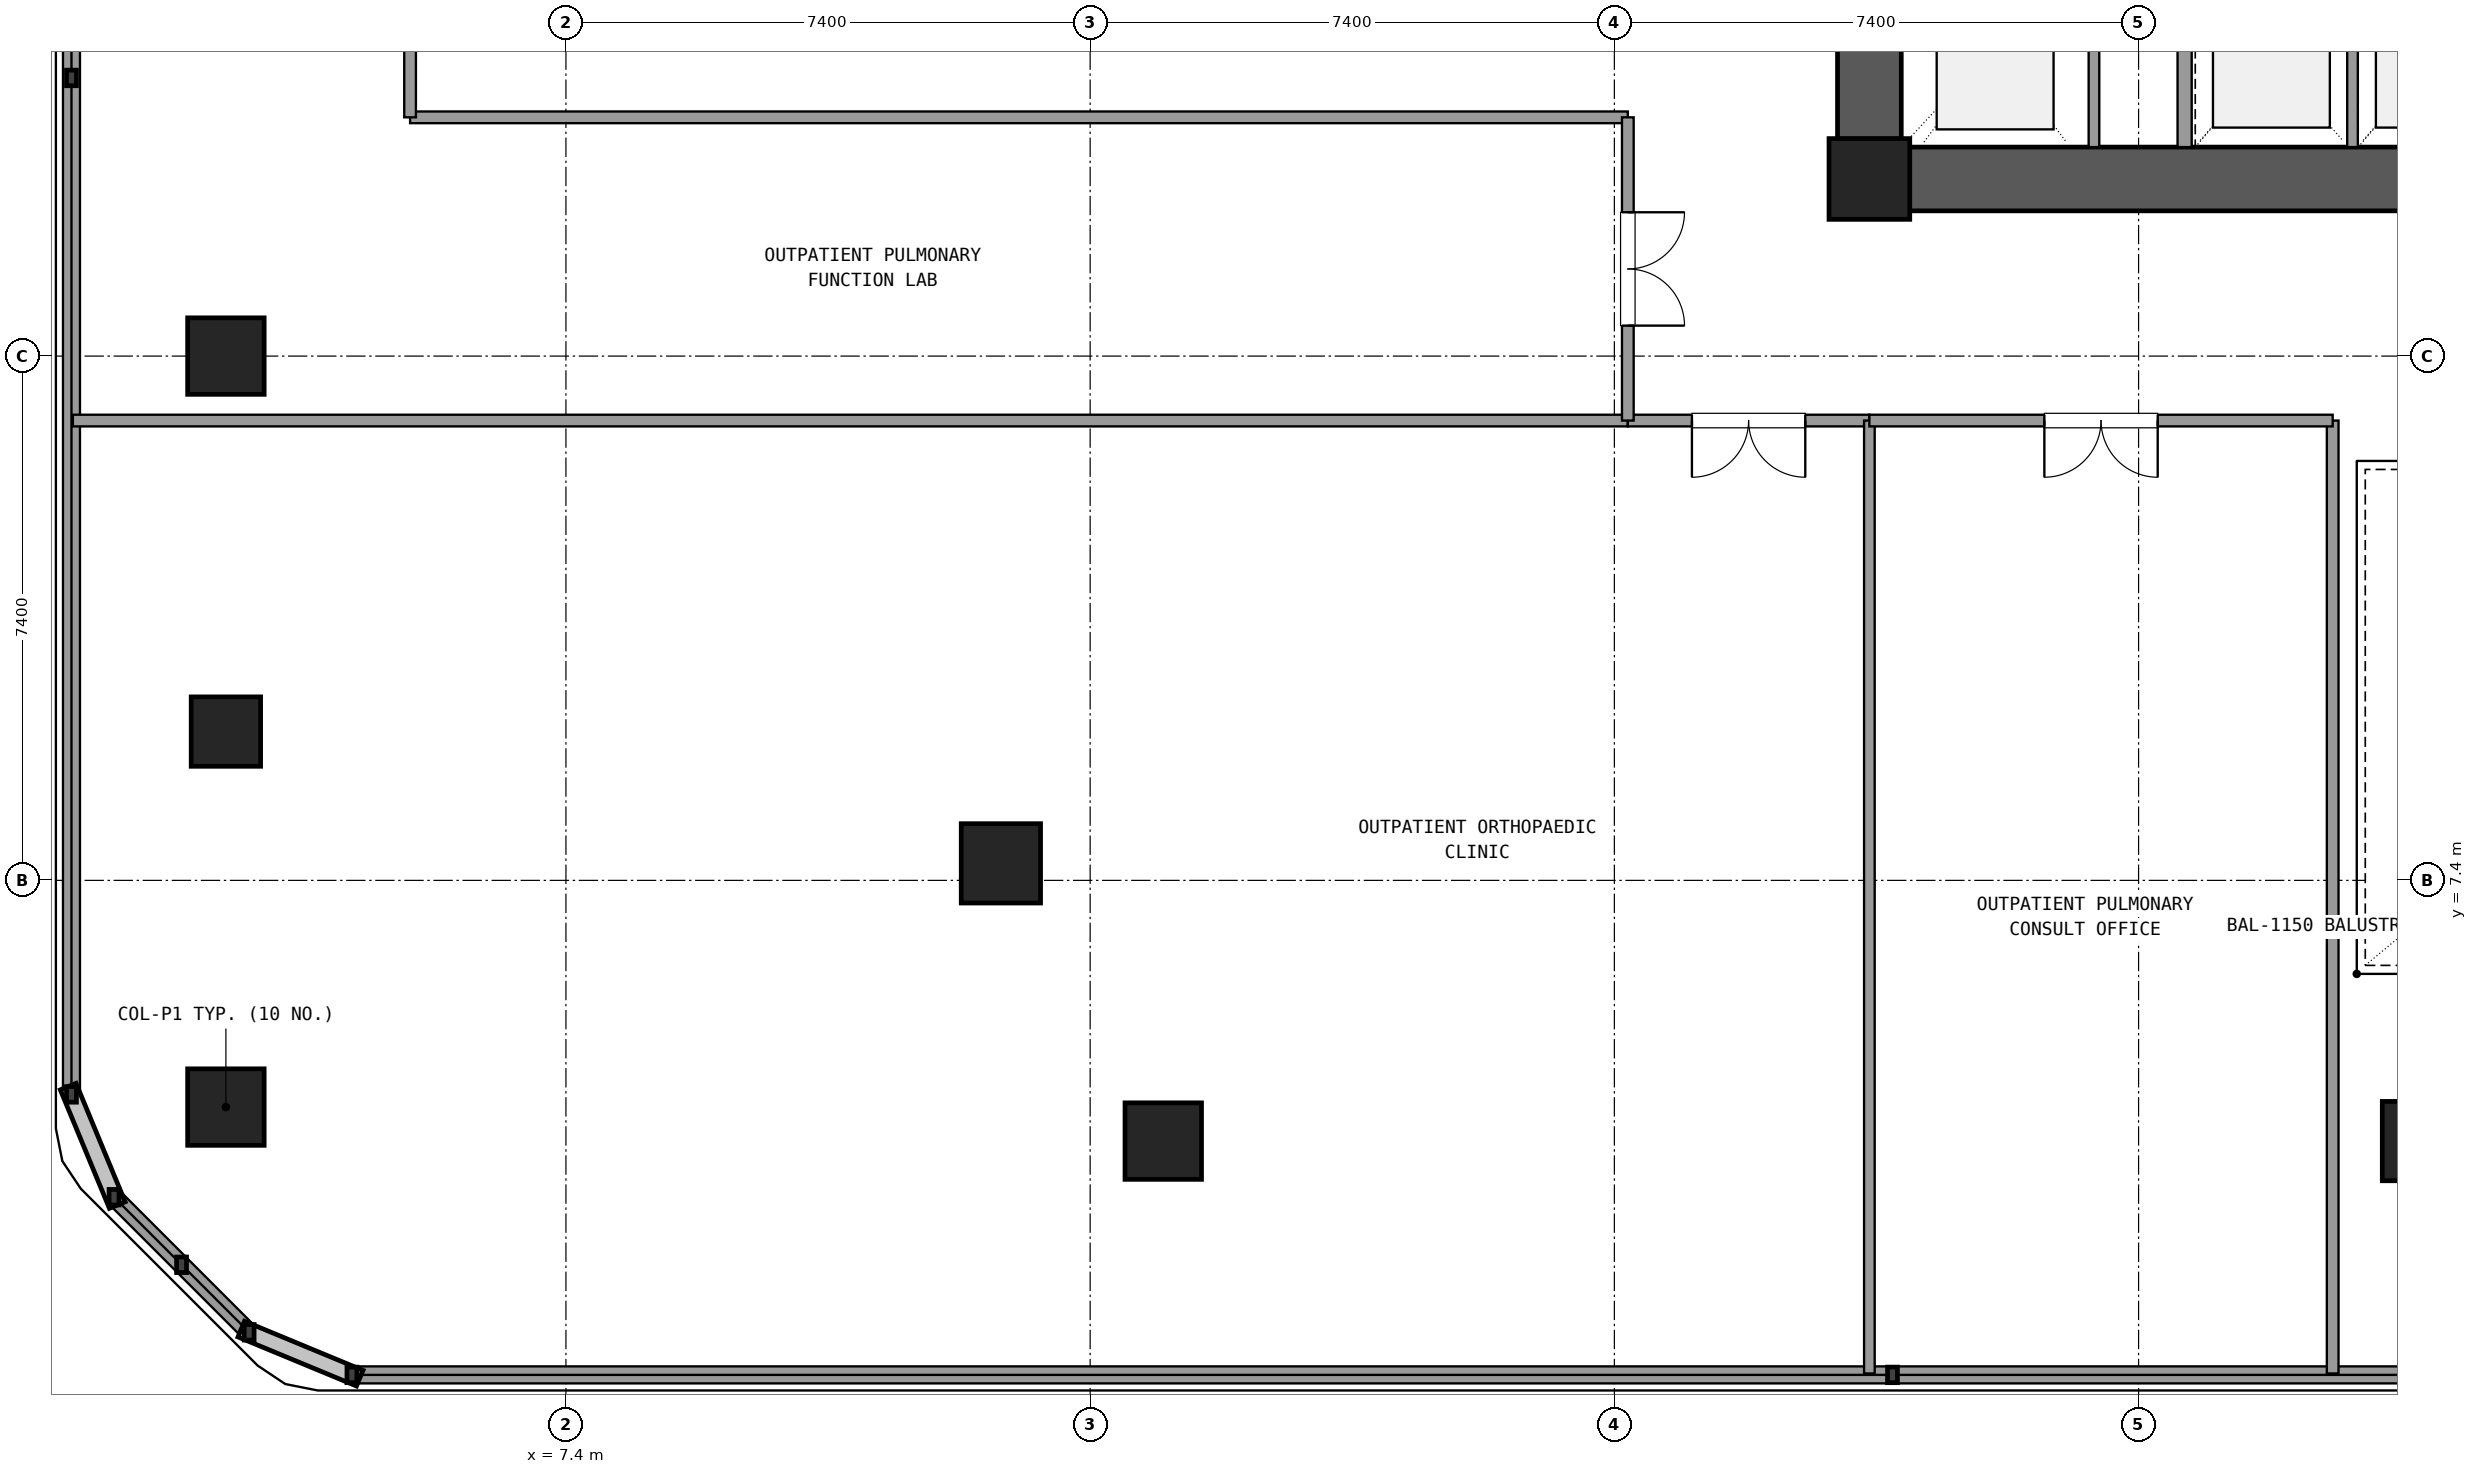
"""IFC4 building model, lengths in metres.
Left out: names, types, materials, properties, quantities, classifications, styles, units other than length and angle.
Written with IfcOpenShell. Run it as: python <this file> out.ifc"""

import sys

from ifc_helpers import new_model, si_unit, direction, frame, frame_2d, origin, origin_2d, place, context, subcontext, project, spatial, rectangle, circle, extrude, element, fill, save


model = new_model("IFC4")
c1 = context("Model", 3, precision=1e-05, world=origin(), true_north=direction((0.0, 1.0)))
c2 = subcontext(c1, "Body", "Model", "MODEL_VIEW")
j1 = project(units=[si_unit("LENGTHUNIT", "METRE"), si_unit("PLANEANGLEUNIT", "RADIAN")], contexts=[c1])
p1 = place(None, origin())
s1 = spatial("IfcSite", under=j1, at=p1, CompositionType="ELEMENT")
p2 = place(p1, origin())
s2 = spatial("IfcBuilding", under=s1, at=p2, CompositionType="ELEMENT")
p3 = place(p2, frame((0.0, 0.0, 5.4)))
s3 = spatial("IfcBuildingStorey", under=s2, at=p3, CompositionType="ELEMENT", Elevation=5.4)
p4 = place(p3, frame((25.8, 17.3, 0.0), z_axis=(0.0, 0.0, 1.0), x_axis=(1.0, 0.0, 0.0)))
e1 = element("IfcColumn", 1, at=p4, inside=s3, PredefinedType="COLUMN", context=c2, shape_type="SweptSolid", body=[
    extrude(rectangle(XDim=1.14, YDim=1.14, at=origin_2d()), origin(), (0.0, 0.0, 1.0), 4.5),
])
p5 = place(p3, frame((26.365, 17.3, 0.0), z_axis=(0.0, 0.0, 1.0), x_axis=(1.0, 0.0, 0.0)))
e2 = element("IfcWall", 2, at=p5, inside=s3, PredefinedType="SHEAR", context=c2, shape_type="SweptSolid", body=[
    extrude(rectangle(XDim=10.07, YDim=0.9, at=frame_2d((5.035, 0.0))), origin(), (0.0, 0.0, 1.0), 4.2),
])
p6 = place(p3, frame((25.8, 25.335, 0.0), z_axis=(0.0, 0.0, 1.0), x_axis=(0.0, -1.0, 0.0)))
e3 = element("IfcWall", 3, at=p6, inside=s3, PredefinedType="SHEAR", context=c2, shape_type="SweptSolid", body=[
    extrude(rectangle(XDim=7.47, YDim=0.9, at=frame_2d((3.735, 0.0))), origin(), (0.0, 0.0, 1.0), 4.2),
])
p7 = place(p6, frame((2.085, 0.0, 0.0)))
e4 = element("IfcOpeningElement", 4, at=p7, cuts=e3, PredefinedType="OPENING", context=c2, shape_type="SweptSolid", body=[
    extrude(rectangle(XDim=1.2, YDim=2.15, at=frame_2d((0.6, 1.075))), frame((0.0, 0.46, 0.0), z_axis=(0.0, -1.0, 0.0), x_axis=(1.0, 0.0, 0.0)), (0.0, 0.0, 1.0), 0.92),
])
p8 = place(p3, frame((13.54, 7.64, 0.0), z_axis=(0.0, 0.0, 1.0), x_axis=(1.0, 0.0, 0.0)))
e5 = element("IfcColumn", 5, at=p8, inside=s3, PredefinedType="COLUMN", context=c2, shape_type="SweptSolid", body=[
    extrude(circle(Radius=0.56, at=origin_2d()), origin(), (0.0, 0.0, 1.0), 4.5),
])
p9 = place(p3, frame((15.832, 3.72, 0.0), z_axis=(0.0, 0.0, 1.0), x_axis=(1.0, 0.0, 0.0)))
e6 = element("IfcColumn", 6, at=p9, inside=s3, PredefinedType="COLUMN", context=c2, shape_type="SweptSolid", body=[
    extrude(rectangle(XDim=1.08, YDim=1.08, at=origin_2d()), origin(), (0.0, 0.0, 1.0), 4.5),
])
p10 = place(p3, frame((33.6, 3.72, 0.0), z_axis=(0.0, 0.0, 1.0), x_axis=(1.0, 0.0, 0.0)))
e7 = element("IfcColumn", 7, at=p10, inside=s3, PredefinedType="COLUMN", context=c2, shape_type="SweptSolid", body=[
    extrude(circle(Radius=0.56, at=origin_2d()), origin(), (0.0, 0.0, 1.0), 4.5),
])
for number, where, z_axis, x_axis in (
    (8, (2.6, 4.2, 0.0), (0.0, 0.0, 1.0), (1.0, 0.0, 0.0)),
    (9, (2.6, 14.8, 0.0), (0.0, 0.0, 1.0), (1.0, 0.0, 0.0)),
):
    element("IfcColumn", number, at=place(p3, frame(where, z_axis=z_axis, x_axis=x_axis)), inside=s3, PredefinedType="COLUMN", context=c2, shape_type="SweptSolid", body=[
        extrude(rectangle(XDim=1.08, YDim=1.08, at=origin_2d()), origin(), (0.0, 0.0, 1.0), 4.5),
    ])
p11 = place(p3, frame((2.6, 9.5, 0.0), z_axis=(0.0, 0.0, 1.0), x_axis=(1.0, 0.0, 0.0)))
e10 = element("IfcColumn", 10, at=p11, inside=s3, PredefinedType="PILASTER", context=c2, shape_type="SweptSolid", body=[
    extrude(circle(Radius=0.49, at=origin_2d()), origin(), (0.0, 0.0, 1.0), 4.5),
])
p12 = place(p3, frame((4.379, 0.42, 0.0), z_axis=(0.0, 0.0, 1.0), x_axis=(1.0, 0.0, 0.0)))
e11 = element("IfcWall", 11, at=p12, inside=s3, PredefinedType="SOLIDWALL", context=c2, shape_type="SweptSolid", body=[
    extrude(rectangle(XDim=65.242, YDim=0.24, at=frame_2d((32.621, 0.0))), origin(), (0.0, 0.0, 1.0), 0.85),
])
p13 = place(p3, frame((0.42, 47.421, 0.0), z_axis=(0.0, 0.0, 1.0), x_axis=(0.0, -1.0, 0.0)))
e12 = element("IfcWall", 12, at=p13, inside=s3, PredefinedType="SOLIDWALL", context=c2, shape_type="SweptSolid", body=[
    extrude(rectangle(XDim=43.042, YDim=0.24, at=frame_2d((21.521, 0.0))), origin(), (0.0, 0.0, 1.0), 0.85),
])
p14 = place(p3, frame((1.021, 2.928, 0.0), z_axis=(0.0, 0.0, 1.0), x_axis=(0.707106781187, -0.707106781187, 0.0)))
e13 = element("IfcWall", 13, at=p14, inside=s3, PredefinedType="SOLIDWALL", context=c2, shape_type="SweptSolid", body=[
    extrude(rectangle(XDim=2.697, YDim=0.24, at=frame_2d((1.348, 0.0))), origin(), (0.0, 0.0, 1.0), 0.85),
])
p15 = place(p3, frame((30.25, 17.75, 0.0), z_axis=(0.0, 0.0, 1.0), x_axis=(0.0, 1.0, 0.0)))
e14 = element("IfcWall", 14, at=p15, inside=s3, PredefinedType="SOLIDWALL", context=c2, shape_type="SweptSolid", body=[
    extrude(rectangle(XDim=6.9, YDim=0.2, at=frame_2d((3.45, 0.0))), origin(), (0.0, 0.0, 1.0), 3.21),
])
p16 = place(p15, frame((4.15, 0.0, 0.0)))
e15 = element("IfcOpeningElement", 15, at=p16, cuts=e14, PredefinedType="OPENING", context=c2, shape_type="SweptSolid", body=[
    extrude(rectangle(XDim=1.2, YDim=2.15, at=frame_2d((0.6, 1.075))), frame((0.0, 0.11, 0.0), z_axis=(0.0, -1.0, 0.0), x_axis=(1.0, 0.0, 0.0)), (0.0, 0.0, 1.0), 0.22),
])
p17 = place(p3, frame((28.97, 17.75, 0.0), z_axis=(0.0, 0.0, 1.0), x_axis=(0.0, 1.0, 0.0)))
e16 = element("IfcWall", 16, at=p17, inside=s3, PredefinedType="PARTITIONING", context=c2, shape_type="SweptSolid", body=[
    extrude(rectangle(XDim=2.95, YDim=0.15, at=frame_2d((1.475, 0.0))), origin(), (0.0, 0.0, 1.0), 3.21),
])
p18 = place(p3, frame((32.62, 17.75, 0.0), z_axis=(0.0, 0.0, 1.0), x_axis=(0.0, 1.0, 0.0)))
e17 = element("IfcWall", 17, at=p18, inside=s3, PredefinedType="PARTITIONING", context=c2, shape_type="SweptSolid", body=[
    extrude(rectangle(XDim=2.61, YDim=0.15, at=frame_2d((1.305, 0.0))), origin(), (0.0, 0.0, 1.0), 3.21),
])
p19 = place(p3, frame((0.44, 13.89, 0.0), z_axis=(0.0, 0.0, 1.0), x_axis=(1.0, 0.0, 0.0)))
e18 = element("IfcWall", 18, at=p19, inside=s3, PredefinedType="PARTITIONING", context=c2, shape_type="SweptSolid", body=[
    extrude(rectangle(XDim=21.95, YDim=0.165, at=frame_2d((10.975, 0.0))), origin(), (0.0, 0.0, 1.0), 3.21),
])
p20 = place(p3, frame((5.2, 18.17, 0.0), z_axis=(0.0, 0.0, 1.0), x_axis=(1.0, 0.0, 0.0)))
e19 = element("IfcWall", 19, at=p20, inside=s3, PredefinedType="PARTITIONING", context=c2, shape_type="SweptSolid", body=[
    extrude(rectangle(XDim=17.19, YDim=0.165, at=frame_2d((8.595, 0.0))), origin(), (0.0, 0.0, 1.0), 3.21),
])
p21 = place(p3, frame((5.2, 18.17, 0.0), z_axis=(0.0, 0.0, 1.0), x_axis=(0.0, 1.0, 0.0)))
e20 = element("IfcWall", 20, at=p21, inside=s3, PredefinedType="PARTITIONING", context=c2, shape_type="SweptSolid", body=[
    extrude(rectangle(XDim=2.93, YDim=0.165, at=frame_2d((1.465, 0.0))), origin(), (0.0, 0.0, 1.0), 3.21),
])
p22 = place(p3, frame((32.34, 0.44, 0.0), z_axis=(0.0, 0.0, 1.0), x_axis=(0.0, 1.0, 0.0)))
e21 = element("IfcWall", 21, at=p22, inside=s3, PredefinedType="PARTITIONING", context=c2, shape_type="SweptSolid", body=[
    extrude(rectangle(XDim=13.45, YDim=0.165, at=frame_2d((6.725, 0.0))), origin(), (0.0, 0.0, 1.0), 3.21),
])
p23 = place(p3, frame((22.39, 13.89, 0.0), z_axis=(0.0, 0.0, 1.0), x_axis=(1.0, 0.0, 0.0)))
e22 = element("IfcWall", 22, at=p23, inside=s3, PredefinedType="PARTITIONING", context=c2, shape_type="SweptSolid", body=[
    extrude(rectangle(XDim=3.41, YDim=0.165, at=frame_2d((1.705, 0.0))), origin(), (0.0, 0.0, 1.0), 3.21),
])
p24 = place(p23, frame((0.905, 0.0, 0.0)))
e23 = element("IfcOpeningElement", 23, at=p24, cuts=e22, PredefinedType="OPENING", context=c2, shape_type="SweptSolid", body=[
    extrude(rectangle(XDim=1.6, YDim=2.2, at=frame_2d((0.8, 1.1))), frame((0.0, 0.093, 0.0), z_axis=(0.0, -1.0, 0.0), x_axis=(1.0, 0.0, 0.0)), (0.0, 0.0, 1.0), 0.185),
])
p25 = place(p3, frame((25.8, 0.44, 0.0), z_axis=(0.0, 0.0, 1.0), x_axis=(0.0, 1.0, 0.0)))
e24 = element("IfcWall", 24, at=p25, inside=s3, PredefinedType="PARTITIONING", context=c2, shape_type="SweptSolid", body=[
    extrude(rectangle(XDim=13.45, YDim=0.15, at=frame_2d((6.725, 0.0))), origin(), (0.0, 0.0, 1.0), 3.21),
])
p26 = place(p3, frame((25.8, 13.89, 0.0), z_axis=(0.0, 0.0, 1.0), x_axis=(1.0, 0.0, 0.0)))
e25 = element("IfcWall", 25, at=p26, inside=s3, PredefinedType="PARTITIONING", context=c2, shape_type="SweptSolid", body=[
    extrude(rectangle(XDim=6.54, YDim=0.165, at=frame_2d((3.27, 0.0))), origin(), (0.0, 0.0, 1.0), 3.21),
])
p27 = place(p26, frame((2.47, 0.0, 0.0)))
e26 = element("IfcOpeningElement", 26, at=p27, cuts=e25, PredefinedType="OPENING", context=c2, shape_type="SweptSolid", body=[
    extrude(rectangle(XDim=1.6, YDim=2.2, at=frame_2d((0.8, 1.1))), frame((0.0, 0.093, 0.0), z_axis=(0.0, -1.0, 0.0), x_axis=(1.0, 0.0, 0.0)), (0.0, 0.0, 1.0), 0.185),
])
p28 = place(p3, frame((22.39, 13.89, 0.0), z_axis=(0.0, 0.0, 1.0), x_axis=(0.0, 1.0, 0.0)))
e27 = element("IfcWall", 27, at=p28, inside=s3, PredefinedType="PARTITIONING", context=c2, shape_type="SweptSolid", body=[
    extrude(rectangle(XDim=4.28, YDim=0.165, at=frame_2d((2.14, 0.0))), origin(), (0.0, 0.0, 1.0), 3.21),
])
p29 = place(p28, frame((1.34, 0.0, 0.0)))
e28 = element("IfcOpeningElement", 28, at=p29, cuts=e27, PredefinedType="OPENING", context=c2, shape_type="SweptSolid", body=[
    extrude(rectangle(XDim=1.6, YDim=2.2, at=frame_2d((0.8, 1.1))), frame((0.0, 0.093, 0.0), z_axis=(0.0, -1.0, 0.0), x_axis=(1.0, 0.0, 0.0)), (0.0, 0.0, 1.0), 0.185),
])
p30 = place(p24, frame((1.6, 0.0, 0.0), z_axis=(0.0, 0.0, 1.0), x_axis=(-1.0, 0.0, 0.0)))
e29 = element("IfcDoor", 29, at=p30, inside=s3, OperationType="DOUBLE_DOOR_SINGLE_SWING", PredefinedType="DOOR", context=c2, shape_type="SweptSolid", body=[
    extrude(rectangle(XDim=1.6, YDim=2.2, at=frame_2d((0.8, 1.1))), frame((0.0, 0.025, 0.0), z_axis=(0.0, -1.0, 0.0), x_axis=(1.0, 0.0, 0.0)), (0.0, 0.0, 1.0), 0.05),
])
fill(e23, e29)
p31 = place(p27, frame((1.6, 0.0, 0.0), z_axis=(0.0, 0.0, 1.0), x_axis=(-1.0, 0.0, 0.0)))
e30 = element("IfcDoor", 30, at=p31, inside=s3, OperationType="DOUBLE_DOOR_SINGLE_SWING", PredefinedType="DOOR", context=c2, shape_type="SweptSolid", body=[
    extrude(rectangle(XDim=1.6, YDim=2.2, at=frame_2d((0.8, 1.1))), frame((0.0, 0.025, 0.0), z_axis=(0.0, -1.0, 0.0), x_axis=(1.0, 0.0, 0.0)), (0.0, 0.0, 1.0), 0.05),
])
fill(e26, e30)
p32 = place(p29, frame((1.6, 0.0, 0.0), z_axis=(0.0, 0.0, 1.0), x_axis=(-1.0, 0.0, 0.0)))
e31 = element("IfcDoor", 31, at=p32, inside=s3, OperationType="DOUBLE_DOOR_SINGLE_SWING", PredefinedType="DOOR", context=c2, shape_type="SweptSolid", body=[
    extrude(rectangle(XDim=1.6, YDim=2.2, at=frame_2d((0.8, 1.1))), frame((0.0, 0.025, 0.0), z_axis=(0.0, -1.0, 0.0), x_axis=(1.0, 0.0, 0.0)), (0.0, 0.0, 1.0), 0.05),
])
fill(e28, e31)
save(model, sys.argv[1])
